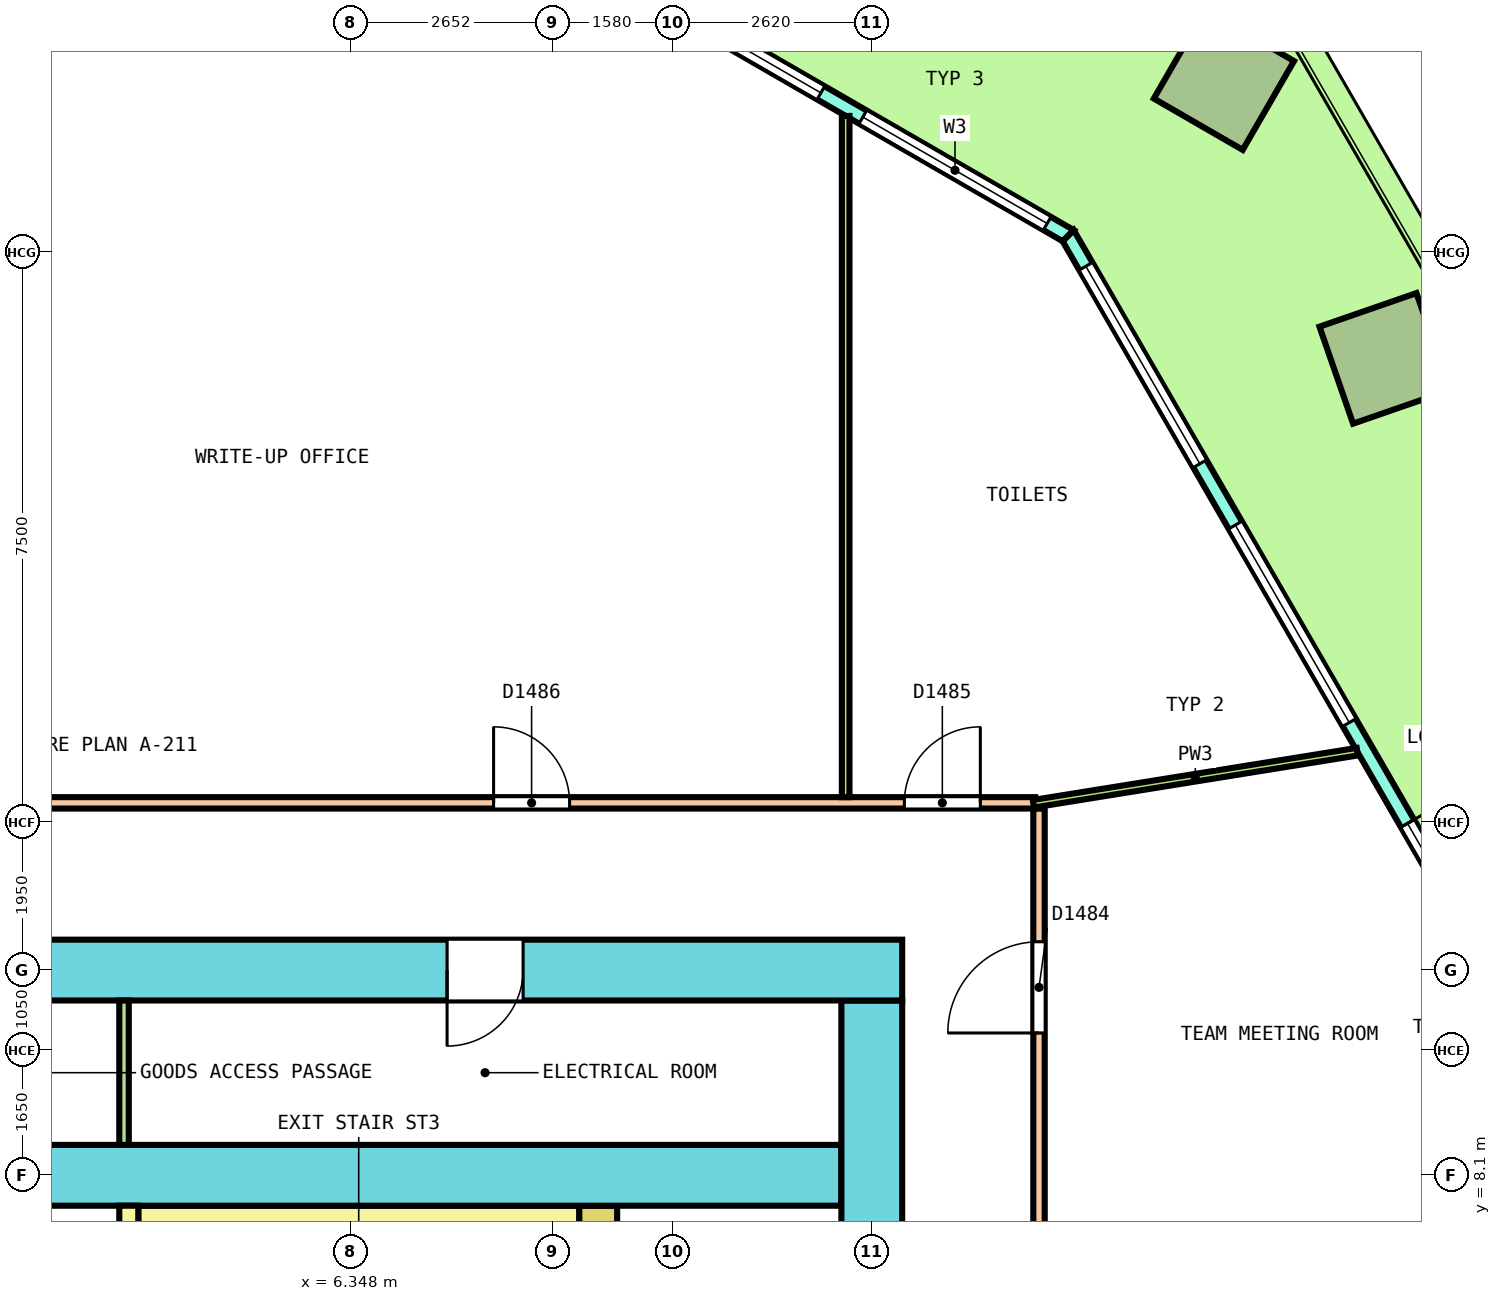
"""IFC4 building model, lengths in metres.
Left out: names, types, materials, properties, quantities, classifications, styles, units other than length and angle.
Written with IfcOpenShell. Run it as: python <this file> out.ifc"""

import sys

from ifc_helpers import new_model, si_unit, direction, frame, frame_2d, origin, origin_2d, place, context, subcontext, project, spatial, polyline, rectangle, outline, extrude, element, fill, save


model = new_model("IFC4")
c1 = context("Model", 3, precision=1e-05, world=origin(), true_north=direction((0.0, 1.0)))
c2 = subcontext(c1, "Body", "Model", "MODEL_VIEW")
j1 = project(units=[si_unit("LENGTHUNIT", "METRE"), si_unit("PLANEANGLEUNIT", "RADIAN")], contexts=[c1])
p1 = place(None, origin())
s1 = spatial("IfcSite", under=j1, at=p1, CompositionType="ELEMENT")
p2 = place(p1, origin())
s2 = spatial("IfcBuilding", under=s1, at=p2, CompositionType="ELEMENT")
p3 = place(p2, frame((0.0, 0.0, 80.8)))
s3 = spatial("IfcBuildingStorey", under=s2, at=p3, CompositionType="ELEMENT", Elevation=80.8)
p4 = place(p3, frame((19.949, 18.847, 0.0), z_axis=(0.032654187208, 0.006265748099, 0.999447069363), x_axis=(-0.499519823947, 0.866234008258, 0.010889831076)))
e1 = element("IfcColumn", 1, at=p4, inside=s3, PredefinedType="COLUMN", context=c2, shape_type="SweptSolid", body=[
    extrude(rectangle(XDim=1.35, YDim=1.35, at=origin_2d()), origin(), (0.0, 0.0, 1.0), 4.052),
])
p5 = place(p3, frame((17.833, 22.512, 0.0), z_axis=(0.036265236264, 0.0, 0.999342199969), x_axis=(-0.865313546461, 0.500246354177, 0.031401456084)))
e2 = element("IfcColumn", 2, at=p5, inside=s3, PredefinedType="COLUMN", context=c2, shape_type="SweptSolid", body=[
    extrude(rectangle(XDim=1.35, YDim=1.35, at=origin_2d()), origin(), (0.0, 0.0, 1.0), 4.053),
])
p6 = place(p3, frame((25.613, 3.437, 0.0), z_axis=(0.0, 0.0, 1.0), x_axis=(-0.499999083763, 0.866025932773, 0.0)))
e3 = element("IfcWall", 3, at=p6, inside=s3, PredefinedType="SOLIDWALL", context=c2, shape_type="SweptSolid", body=[
    extrude(outline(polyline([(-0.027, -0.1), (1.011, -0.1), (2.048, -0.1), (3.086, -0.1), (4.123, -0.1), (5.161, -0.1), (6.198, -0.1), (7.236, -0.1), (8.273, -0.1), (9.311, -0.1), (10.348, -0.1), (11.386, -0.1), (12.423, -0.1), (13.461, -0.1), (14.499, -0.1), (15.536, -0.1), (16.573, -0.1), (17.611, -0.1), (18.648, -0.1), (19.686, -0.1), (19.632, 0.1), (18.6, 0.1), (17.569, 0.1), (16.537, 0.1), (15.505, 0.1), (14.473, 0.1), (13.441, 0.1), (12.409, 0.1), (11.377, 0.1), (10.345, 0.1), (9.314, 0.1), (8.282, 0.1), (7.25, 0.1), (6.218, 0.1), (5.186, 0.1), (4.154, 0.1), (3.123, 0.1), (2.091, 0.1), (1.059, 0.1), (0.027, 0.1), (-0.027, -0.1)])), origin(), (0.0, 0.0, 1.0), 4.1),
])
p7 = place(p6, frame((0.466, 0.0, 0.1)))
e4 = element("IfcOpeningElement", 4, at=p7, cuts=e3, PredefinedType="OPENING", context=c2, shape_type="SweptSolid", body=[
    extrude(rectangle(XDim=3.0, YDim=2.9, at=frame_2d((1.5, 1.45))), frame((0.0, 0.11, 0.0), z_axis=(0.0, -1.0, 0.0), x_axis=(1.0, 0.0, 0.0)), (0.0, 0.0, 1.0), 0.22),
])
p8 = place(p6, frame((4.398, 0.0, 0.1)))
e5 = element("IfcOpeningElement", 5, at=p8, cuts=e3, PredefinedType="OPENING", context=c2, shape_type="SweptSolid", body=[
    extrude(rectangle(XDim=3.0, YDim=2.9, at=frame_2d((1.5, 1.45))), frame((0.0, 0.11, 0.0), z_axis=(0.0, -1.0, 0.0), x_axis=(1.0, 0.0, 0.0)), (0.0, 0.0, 1.0), 0.22),
])
p9 = place(p6, frame((8.93, 0.0, 0.0)))
e6 = element("IfcOpeningElement", 6, at=p9, cuts=e3, PredefinedType="OPENING", context=c2, shape_type="SweptSolid", body=[
    extrude(rectangle(XDim=1.8, YDim=2.4, at=frame_2d((0.9, 1.2))), frame((0.0, 0.11, 0.0), z_axis=(0.0, -1.0, 0.0), x_axis=(1.0, 0.0, 0.0)), (0.0, 0.0, 1.0), 0.22),
])
p10 = place(p6, frame((8.93, 0.0, 2.55)))
e7 = element("IfcOpeningElement", 7, at=p10, cuts=e3, PredefinedType="OPENING", context=c2, shape_type="SweptSolid", body=[
    extrude(rectangle(XDim=1.8, YDim=0.45, at=frame_2d((0.9, 0.225))), frame((0.0, 0.11, 0.0), z_axis=(0.0, -1.0, 0.0), x_axis=(1.0, 0.0, 0.0)), (0.0, 0.0, 1.0), 0.22),
])
p11 = place(p6, frame((12.261, 0.0, 0.1)))
e8 = element("IfcOpeningElement", 8, at=p11, cuts=e3, PredefinedType="OPENING", context=c2, shape_type="SweptSolid", body=[
    extrude(rectangle(XDim=3.0, YDim=2.9, at=frame_2d((1.5, 1.45))), frame((0.0, 0.11, 0.0), z_axis=(0.0, -1.0, 0.0), x_axis=(1.0, 0.0, 0.0)), (0.0, 0.0, 1.0), 0.22),
])
p12 = place(p6, frame((16.193, 0.0, 0.1)))
e9 = element("IfcOpeningElement", 9, at=p12, cuts=e3, PredefinedType="OPENING", context=c2, shape_type="SweptSolid", body=[
    extrude(rectangle(XDim=3.0, YDim=2.9, at=frame_2d((1.5, 1.45))), frame((0.0, 0.11, 0.0), z_axis=(0.0, -1.0, 0.0), x_axis=(1.0, 0.0, 0.0)), (0.0, 0.0, 1.0), 0.22),
])
p13 = place(p3, frame((15.783, 20.463, 0.0), z_axis=(0.0, 0.0, 1.0), x_axis=(-0.866029458321, 0.49999297727, 0.0)))
e10 = element("IfcWall", 10, at=p13, inside=s3, PredefinedType="SOLIDWALL", context=c2, shape_type="SweptSolid", body=[
    extrude(outline(polyline([(-0.027, -0.1), (1.128, -0.1), (2.282, -0.1), (3.437, -0.1), (4.592, -0.1), (5.747, -0.1), (6.901, -0.1), (6.848, 0.1), (5.711, 0.1), (4.574, 0.1), (3.437, 0.1), (2.301, 0.1), (1.164, 0.1), (0.027, 0.1), (-0.027, -0.1)])), origin(), (0.0, 0.0, 1.0), 4.1),
])
p14 = place(p13, frame((0.319, 0.0, 0.1)))
e11 = element("IfcOpeningElement", 11, at=p14, cuts=e10, PredefinedType="OPENING", context=c2, shape_type="SweptSolid", body=[
    extrude(rectangle(XDim=2.8, YDim=2.9, at=frame_2d((1.4, 1.45))), frame((0.0, 0.11, 0.0), z_axis=(0.0, -1.0, 0.0), x_axis=(1.0, 0.0, 0.0)), (0.0, 0.0, 1.0), 0.22),
])
p15 = place(p13, frame((3.756, 0.0, 0.1)))
e12 = element("IfcOpeningElement", 12, at=p15, cuts=e10, PredefinedType="OPENING", context=c2, shape_type="SweptSolid", body=[
    extrude(rectangle(XDim=2.8, YDim=2.9, at=frame_2d((1.4, 1.45))), frame((0.0, 0.11, 0.0), z_axis=(0.0, -1.0, 0.0), x_axis=(1.0, 0.0, 0.0)), (0.0, 0.0, 1.0), 0.22),
])
p16 = place(p3, frame((-13.6, 10.8, 0.0), z_axis=(0.0, 0.0, 1.0), x_axis=(1.0, 0.0, 0.0)))
e13 = element("IfcWall", 13, at=p16, inside=s3, PredefinedType="SHEAR", context=c2, shape_type="SweptSolid", body=[
    extrude(rectangle(XDim=27.2, YDim=0.8, at=frame_2d((13.6, 0.0))), origin(), (0.0, 0.0, 1.0), 4.1),
])
p17 = place(p16, frame((1.798, 0.0, 0.0)))
e14 = element("IfcOpeningElement", 14, at=p17, cuts=e13, PredefinedType="OPENING", context=c2, shape_type="SweptSolid", body=[
    extrude(rectangle(XDim=1.0, YDim=2.1, at=frame_2d((0.5, 1.05))), frame((0.0, 0.41, 0.0), z_axis=(0.0, -1.0, 0.0), x_axis=(1.0, 0.0, 0.0)), (0.0, 0.0, 1.0), 0.82),
])
p18 = place(p16, frame((4.889, 0.0, 0.0)))
e15 = element("IfcOpeningElement", 15, at=p18, cuts=e13, PredefinedType="OPENING", context=c2, shape_type="SweptSolid", body=[
    extrude(rectangle(XDim=1.0, YDim=2.1, at=frame_2d((0.5, 1.05))), frame((0.0, 0.41, 0.0), z_axis=(0.0, -1.0, 0.0), x_axis=(1.0, 0.0, 0.0)), (0.0, 0.0, 1.0), 0.82),
])
p19 = place(p16, frame((7.948, 0.0, 0.0)))
e16 = element("IfcOpeningElement", 16, at=p19, cuts=e13, PredefinedType="OPENING", context=c2, shape_type="SweptSolid", body=[
    extrude(rectangle(XDim=1.0, YDim=2.1, at=frame_2d((0.5, 1.05))), frame((0.0, 0.41, 0.0), z_axis=(0.0, -1.0, 0.0), x_axis=(1.0, 0.0, 0.0)), (0.0, 0.0, 1.0), 0.82),
])
p20 = place(p16, frame((11.008, 0.0, 0.0)))
e17 = element("IfcOpeningElement", 17, at=p20, cuts=e13, PredefinedType="OPENING", context=c2, shape_type="SweptSolid", body=[
    extrude(rectangle(XDim=1.0, YDim=2.1, at=frame_2d((0.5, 1.05))), frame((0.0, 0.41, 0.0), z_axis=(0.0, -1.0, 0.0), x_axis=(1.0, 0.0, 0.0)), (0.0, 0.0, 1.0), 0.82),
])
p21 = place(p16, frame((21.212, 0.0, 0.0)))
e18 = element("IfcOpeningElement", 18, at=p21, cuts=e13, PredefinedType="OPENING", context=c2, shape_type="SweptSolid", body=[
    extrude(rectangle(XDim=1.0, YDim=2.1, at=frame_2d((0.5, 1.05))), frame((0.0, 0.41, 0.0), z_axis=(0.0, -1.0, 0.0), x_axis=(1.0, 0.0, 0.0)), (0.0, 0.0, 1.0), 0.82),
])
p22 = place(p16, frame((14.525, 0.0, 0.0)))
e19 = element("IfcOpeningElement", 19, at=p22, cuts=e13, PredefinedType="OPENING", context=c2, shape_type="SweptSolid", body=[
    extrude(rectangle(XDim=1.4, YDim=2.1, at=frame_2d((0.7, 1.05))), frame((0.0, 0.41, 0.0), z_axis=(0.0, -1.0, 0.0), x_axis=(1.0, 0.0, 0.0)), (0.0, 0.0, 1.0), 0.82),
])
p23 = place(p3, frame((13.2, -10.4, 0.0), z_axis=(0.0, 0.0, 1.0), x_axis=(0.0, 1.0, 0.0)))
e20 = element("IfcWall", 20, at=p23, inside=s3, PredefinedType="SHEAR", context=c2, shape_type="SweptSolid", body=[
    extrude(rectangle(XDim=20.8, YDim=0.8, at=frame_2d((10.4, 0.0))), origin(), (0.0, 0.0, 1.0), 4.1),
])
p24 = place(p23, frame((9.2, 0.0, 0.0)))
e21 = element("IfcOpeningElement", 21, at=p24, cuts=e20, PredefinedType="OPENING", context=c2, shape_type="SweptSolid", body=[
    extrude(rectangle(XDim=2.4, YDim=2.1, at=frame_2d((1.2, 1.05))), frame((0.0, 0.41, 0.0), z_axis=(0.0, -1.0, 0.0), x_axis=(1.0, 0.0, 0.0)), (0.0, 0.0, 1.0), 0.82),
])
p25 = place(p23, frame((16.1, 0.0, 0.0)))
e22 = element("IfcOpeningElement", 22, at=p25, cuts=e20, PredefinedType="OPENING", context=c2, shape_type="SweptSolid", body=[
    extrude(rectangle(XDim=1.2, YDim=2.1, at=frame_2d((0.6, 1.05))), frame((0.0, 0.41, 0.0), z_axis=(0.0, -1.0, 0.0), x_axis=(1.0, 0.0, 0.0)), (0.0, 0.0, 1.0), 0.82),
])
p26 = place(p23, frame((2.869, 0.0, 0.0)))
e23 = element("IfcOpeningElement", 23, at=p26, cuts=e20, PredefinedType="OPENING", context=c2, shape_type="SweptSolid", body=[
    extrude(rectangle(XDim=1.0, YDim=2.1, at=frame_2d((0.5, 1.05))), frame((0.0, 0.41, 0.0), z_axis=(0.0, -1.0, 0.0), x_axis=(1.0, 0.0, 0.0)), (0.0, 0.0, 1.0), 0.82),
])
p27 = place(p23, frame((4.331, 0.0, 0.0)))
e24 = element("IfcOpeningElement", 24, at=p27, cuts=e20, PredefinedType="OPENING", context=c2, shape_type="SweptSolid", body=[
    extrude(rectangle(XDim=1.0, YDim=2.1, at=frame_2d((0.5, 1.05))), frame((0.0, 0.41, 0.0), z_axis=(0.0, -1.0, 0.0), x_axis=(1.0, 0.0, 0.0)), (0.0, 0.0, 1.0), 0.82),
])
p28 = place(p3, frame((-12.8, 8.1, 0.0), z_axis=(0.0, 0.0, 1.0), x_axis=(1.0, 0.0, 0.0)))
e25 = element("IfcWall", 25, at=p28, inside=s3, PredefinedType="SHEAR", context=c2, shape_type="SweptSolid", body=[
    extrude(rectangle(XDim=25.6, YDim=0.8, at=frame_2d((12.8, 0.0))), origin(), (0.0, 0.0, 1.0), 4.1),
])
p29 = place(p28, frame((13.725, 0.0, 0.0)))
e26 = element("IfcOpeningElement", 26, at=p29, cuts=e25, PredefinedType="OPENING", context=c2, shape_type="SweptSolid", body=[
    extrude(rectangle(XDim=1.4, YDim=2.1, at=frame_2d((0.7, 1.05))), frame((0.0, 0.41, 0.0), z_axis=(0.0, -1.0, 0.0), x_axis=(1.0, 0.0, 0.0)), (0.0, 0.0, 1.0), 0.82),
])
p30 = place(p3, frame((9.6, -7.7, 0.0), z_axis=(0.0, 0.0, 1.0), x_axis=(0.0, 1.0, 0.0)))
e27 = element("IfcWall", 27, at=p30, inside=s3, PredefinedType="SHEAR", context=c2, shape_type="SweptSolid", body=[
    extrude(rectangle(XDim=15.4, YDim=0.5, at=frame_2d((7.7, 0.0))), origin(), (0.0, 0.0, 1.0), 4.1),
])
p31 = place(p30, frame((6.5, 0.0, 0.0)))
e28 = element("IfcOpeningElement", 28, at=p31, cuts=e27, PredefinedType="OPENING", context=c2, shape_type="SweptSolid", body=[
    extrude(rectangle(XDim=2.4, YDim=2.1, at=frame_2d((1.2, 1.05))), frame((0.0, 0.26, 0.0), z_axis=(0.0, -1.0, 0.0), x_axis=(1.0, 0.0, 0.0)), (0.0, 0.0, 1.0), 0.52),
])
p32 = place(p30, frame((13.4, 0.0, 0.0)))
e29 = element("IfcOpeningElement", 29, at=p32, cuts=e27, PredefinedType="OPENING", context=c2, shape_type="SweptSolid", body=[
    extrude(rectangle(XDim=1.2, YDim=2.1, at=frame_2d((0.6, 1.05))), frame((0.0, 0.26, 0.0), z_axis=(0.0, -1.0, 0.0), x_axis=(1.0, 0.0, 0.0)), (0.0, 0.0, 1.0), 0.52),
])
p33 = place(p30, frame((0.9, 0.0, 0.0)))
e30 = element("IfcOpeningElement", 30, at=p33, cuts=e27, PredefinedType="OPENING", context=c2, shape_type="SweptSolid", body=[
    extrude(rectangle(XDim=1.0, YDim=2.1, at=frame_2d((0.5, 1.05))), frame((0.0, 0.26, 0.0), z_axis=(0.0, -1.0, 0.0), x_axis=(1.0, 0.0, 0.0)), (0.0, 0.0, 1.0), 0.52),
])
p34 = place(p3, frame((3.55, 7.575, 0.0), z_axis=(0.0, 0.0, 1.0), x_axis=(1.0, 0.0, 0.0)))
e31 = element("IfcWall", 31, at=p34, inside=s3, PredefinedType="SOLIDWALL", context=c2, shape_type="SweptSolid", body=[
    extrude(rectangle(XDim=5.8, YDim=0.25, at=frame_2d((2.9, 0.0))), origin(), (0.0, 0.0, 1.0), 4.1),
])
p35 = place(p3, frame((3.425, 4.9, 0.0), z_axis=(0.0, 0.0, 1.0), x_axis=(0.0, 1.0, 0.0)))
e32 = element("IfcWall", 32, at=p35, inside=s3, PredefinedType="SOLIDWALL", context=c2, shape_type="SweptSolid", body=[
    extrude(rectangle(XDim=2.8, YDim=0.25, at=frame_2d((1.4, 0.0))), origin(), (0.0, 0.0, 1.0), 4.1),
])
p36 = place(p3, frame((3.363, 8.5, 0.0), z_axis=(0.0, 0.0, 1.0), x_axis=(0.0, 1.0, 0.0)))
e33 = element("IfcWall", 33, at=p36, inside=s3, PredefinedType="PARTITIONING", context=c2, shape_type="SweptSolid", body=[
    extrude(rectangle(XDim=1.9, YDim=0.125, at=frame_2d((0.95, 0.0))), origin(), (0.0, 0.0, 1.0), 4.1),
])
p37 = place(p3, frame((15.4, -12.925, 0.0), z_axis=(0.0, 0.0, 1.0), x_axis=(0.0, 1.0, 0.0)))
e34 = element("IfcWall", 34, at=p37, inside=s3, PredefinedType="PARTITIONING", context=c2, shape_type="SweptSolid", body=[
    extrude(rectangle(XDim=25.85, YDim=0.15, at=frame_2d((12.925, 0.0))), origin(), (0.0, 0.0, 1.0), 3.05),
])
p38 = place(p37, frame((15.289, 0.0, 0.0)))
e35 = element("IfcOpeningElement", 35, at=p38, cuts=e34, PredefinedType="OPENING", context=c2, shape_type="SweptSolid", body=[
    extrude(rectangle(XDim=1.2, YDim=2.1, at=frame_2d((0.6, 1.05))), frame((0.0, 0.085, 0.0), z_axis=(0.0, -1.0, 0.0), x_axis=(1.0, 0.0, 0.0)), (0.0, 0.0, 1.0), 0.17),
])
p39 = place(p37, frame((22.897, 0.0, 0.0)))
e36 = element("IfcOpeningElement", 36, at=p39, cuts=e34, PredefinedType="OPENING", context=c2, shape_type="SweptSolid", body=[
    extrude(rectangle(XDim=1.2, YDim=2.1, at=frame_2d((0.6, 1.05))), frame((0.0, 0.085, 0.0), z_axis=(0.0, -1.0, 0.0), x_axis=(1.0, 0.0, 0.0)), (0.0, 0.0, 1.0), 0.17),
])
p40 = place(p37, frame((1.823, 0.0, 0.0)))
e37 = element("IfcOpeningElement", 37, at=p40, cuts=e34, PredefinedType="OPENING", context=c2, shape_type="SweptSolid", body=[
    extrude(rectangle(XDim=1.0, YDim=2.1, at=frame_2d((0.5, 1.05))), frame((0.0, 0.085, 0.0), z_axis=(0.0, -1.0, 0.0), x_axis=(1.0, 0.0, 0.0)), (0.0, 0.0, 1.0), 0.17),
])
p41 = place(p3, frame((-15.325, 13.0, 0.0), z_axis=(0.0, 0.0, 1.0), x_axis=(1.0, 0.0, 0.0)))
e38 = element("IfcWall", 38, at=p41, inside=s3, PredefinedType="PARTITIONING", context=c2, shape_type="SweptSolid", body=[
    extrude(rectangle(XDim=30.675, YDim=0.15, at=frame_2d((15.337, 0.0))), origin(), (0.0, 0.0, 1.0), 3.05),
])
p42 = place(p41, frame((28.953, 0.0, 0.0)))
e39 = element("IfcOpeningElement", 39, at=p42, cuts=e38, PredefinedType="OPENING", context=c2, shape_type="SweptSolid", body=[
    extrude(rectangle(XDim=1.0, YDim=2.1, at=frame_2d((0.5, 1.05))), frame((0.0, 0.085, 0.0), z_axis=(0.0, -1.0, 0.0), x_axis=(1.0, 0.0, 0.0)), (0.0, 0.0, 1.0), 0.17),
])
p43 = place(p41, frame((23.55, 0.0, 0.0)))
e40 = element("IfcOpeningElement", 40, at=p43, cuts=e38, PredefinedType="OPENING", context=c2, shape_type="SweptSolid", body=[
    extrude(rectangle(XDim=1.0, YDim=2.1, at=frame_2d((0.5, 1.05))), frame((0.0, 0.085, 0.0), z_axis=(0.0, -1.0, 0.0), x_axis=(1.0, 0.0, 0.0)), (0.0, 0.0, 1.0), 0.17),
])
p44 = place(p41, frame((7.769, 0.0, 0.0)))
e41 = element("IfcOpeningElement", 41, at=p44, cuts=e38, PredefinedType="OPENING", context=c2, shape_type="SweptSolid", body=[
    extrude(rectangle(XDim=1.2, YDim=2.1, at=frame_2d((0.6, 1.05))), frame((0.0, 0.085, 0.0), z_axis=(0.0, -1.0, 0.0), x_axis=(1.0, 0.0, 0.0)), (0.0, 0.0, 1.0), 0.17),
])
p45 = place(p3, frame((15.326, 12.988, 0.0), z_axis=(0.0, 0.0, 1.0), x_axis=(0.987325307202, 0.158709601971, 0.0)))
e42 = element("IfcWall", 42, at=p45, inside=s3, PredefinedType="PARTITIONING", context=c2, shape_type="SweptSolid", body=[
    extrude(rectangle(XDim=4.316, YDim=0.1, at=frame_2d((2.158, 0.0))), origin(), (0.0, 0.0, 1.0), 3.05),
])
p46 = place(p3, frame((12.856, 13.075, 0.0), z_axis=(0.0, 0.0, 1.0), x_axis=(0.0, 1.0, 0.0)))
e43 = element("IfcWall", 43, at=p46, inside=s3, PredefinedType="PARTITIONING", context=c2, shape_type="SweptSolid", body=[
    extrude(rectangle(XDim=8.962, YDim=0.1, at=frame_2d((4.481, 0.0))), origin(), (0.0, 0.0, 1.0), 3.05),
])
p47 = place(p9, origin())
e44 = element("IfcDoor", 44, at=p47, inside=s3, OperationType="DOUBLE_DOOR_SINGLE_SWING", PredefinedType="DOOR", context=c2, shape_type="SweptSolid", body=[
    extrude(rectangle(XDim=1.8, YDim=2.4, at=frame_2d((0.9, 1.2))), frame((0.0, 0.025, 0.0), z_axis=(0.0, -1.0, 0.0), x_axis=(1.0, 0.0, 0.0)), (0.0, 0.0, 1.0), 0.05),
])
fill(e6, e44)
p48 = place(p10, origin())
e45 = element("IfcWindow", 45, at=p48, inside=s3, PartitioningType="SINGLE_PANEL", PredefinedType="WINDOW", context=c2, shape_type="SweptSolid", body=[
    extrude(rectangle(XDim=1.8, YDim=0.45, at=frame_2d((0.9, 0.225))), frame((0.0, 0.03, 0.0), z_axis=(0.0, -1.0, 0.0), x_axis=(1.0, 0.0, 0.0)), (0.0, 0.0, 1.0), 0.06),
])
fill(e7, e45)
p49 = place(p11, origin())
e46 = element("IfcWindow", 46, at=p49, inside=s3, PartitioningType="SINGLE_PANEL", PredefinedType="WINDOW", context=c2, shape_type="SweptSolid", body=[
    extrude(rectangle(XDim=3.0, YDim=2.9, at=frame_2d((1.5, 1.45))), frame((0.0, 0.03, 0.0), z_axis=(0.0, -1.0, 0.0), x_axis=(1.0, 0.0, 0.0)), (0.0, 0.0, 1.0), 0.06),
])
fill(e8, e46)
p50 = place(p12, origin())
e47 = element("IfcWindow", 47, at=p50, inside=s3, PartitioningType="SINGLE_PANEL", PredefinedType="WINDOW", context=c2, shape_type="SweptSolid", body=[
    extrude(rectangle(XDim=3.0, YDim=2.9, at=frame_2d((1.5, 1.45))), frame((0.0, 0.03, 0.0), z_axis=(0.0, -1.0, 0.0), x_axis=(1.0, 0.0, 0.0)), (0.0, 0.0, 1.0), 0.06),
])
fill(e9, e47)
p51 = place(p14, origin())
e48 = element("IfcWindow", 48, at=p51, inside=s3, PartitioningType="SINGLE_PANEL", PredefinedType="WINDOW", context=c2, shape_type="SweptSolid", body=[
    extrude(rectangle(XDim=2.8, YDim=2.9, at=frame_2d((1.4, 1.45))), frame((0.0, 0.03, 0.0), z_axis=(0.0, -1.0, 0.0), x_axis=(1.0, 0.0, 0.0)), (0.0, 0.0, 1.0), 0.06),
])
fill(e11, e48)
p52 = place(p15, origin())
e49 = element("IfcWindow", 49, at=p52, inside=s3, PartitioningType="SINGLE_PANEL", PredefinedType="WINDOW", context=c2, shape_type="SweptSolid", body=[
    extrude(rectangle(XDim=2.8, YDim=2.9, at=frame_2d((1.4, 1.45))), frame((0.0, 0.03, 0.0), z_axis=(0.0, -1.0, 0.0), x_axis=(1.0, 0.0, 0.0)), (0.0, 0.0, 1.0), 0.06),
])
fill(e12, e49)
p53 = place(p21, origin())
e50 = element("IfcDoor", 50, at=p53, inside=s3, OperationType="SINGLE_SWING_RIGHT", PredefinedType="DOOR", context=c2, shape_type="SweptSolid", body=[
    extrude(rectangle(XDim=1.0, YDim=2.1, at=frame_2d((0.5, 1.05))), frame((0.0, 0.3, 0.0), z_axis=(0.0, -1.0, 0.0), x_axis=(1.0, 0.0, 0.0)), (0.0, 0.0, 1.0), 0.6),
])
fill(e18, e50)
p54 = place(p39, origin())
e51 = element("IfcDoor", 51, at=p54, inside=s3, OperationType="DOUBLE_DOOR_SINGLE_SWING", PredefinedType="DOOR", context=c2, shape_type="SweptSolid", body=[
    extrude(rectangle(XDim=1.2, YDim=2.1, at=frame_2d((0.6, 1.05))), frame((0.0, 0.025, 0.0), z_axis=(0.0, -1.0, 0.0), x_axis=(1.0, 0.0, 0.0)), (0.0, 0.0, 1.0), 0.05),
])
fill(e36, e51)
p55 = place(p42, origin())
e52 = element("IfcDoor", 52, at=p55, inside=s3, OperationType="SINGLE_SWING_LEFT", PredefinedType="DOOR", context=c2, shape_type="SweptSolid", body=[
    extrude(rectangle(XDim=1.0, YDim=2.1, at=frame_2d((0.5, 1.05))), frame((0.0, 0.025, 0.0), z_axis=(0.0, -1.0, 0.0), x_axis=(1.0, 0.0, 0.0)), (0.0, 0.0, 1.0), 0.05),
])
fill(e39, e52)
p56 = place(p43, origin())
e53 = element("IfcDoor", 53, at=p56, inside=s3, OperationType="SINGLE_SWING_RIGHT", PredefinedType="DOOR", context=c2, shape_type="SweptSolid", body=[
    extrude(rectangle(XDim=1.0, YDim=2.1, at=frame_2d((0.5, 1.05))), frame((0.0, 0.025, 0.0), z_axis=(0.0, -1.0, 0.0), x_axis=(1.0, 0.0, 0.0)), (0.0, 0.0, 1.0), 0.05),
])
fill(e40, e53)
save(model, sys.argv[1])
